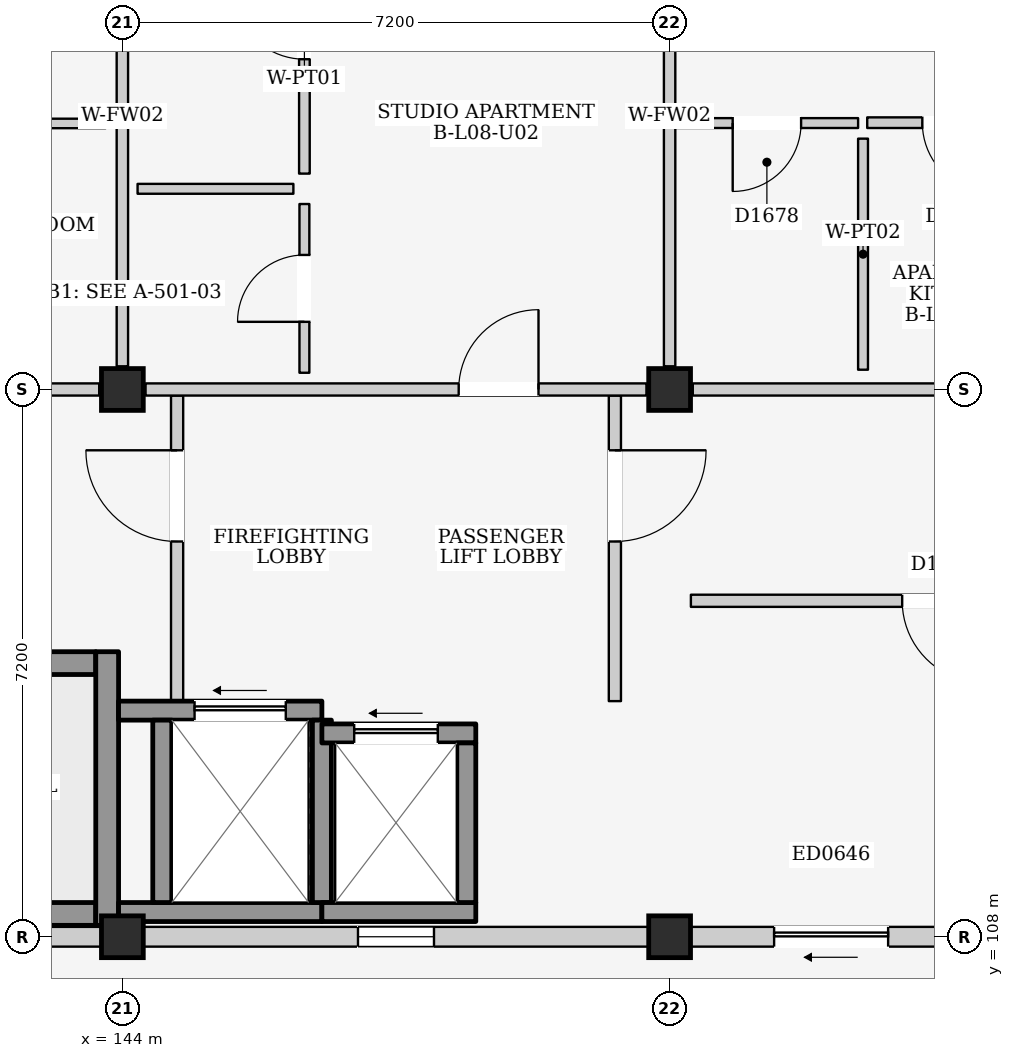
"""IFC4 building model, lengths in metres.
Left out: names, types, materials, properties, quantities, classifications, styles, units other than length and angle.
Written with IfcOpenShell. Run it as: python <this file> out.ifc"""

import sys

from ifc_helpers import new_model, si_unit, direction, frame, frame_2d, origin, origin_2d, place, context, subcontext, project, spatial, rectangle, extrude, element, fill, save


model = new_model("IFC4")
c1 = context("Model", 3, precision=1e-05, world=origin(), true_north=direction((0.0, 1.0)))
c2 = subcontext(c1, "Body", "Model", "MODEL_VIEW")
j1 = project(units=[si_unit("LENGTHUNIT", "METRE"), si_unit("PLANEANGLEUNIT", "RADIAN")], contexts=[c1])
p1 = place(None, origin())
s1 = spatial("IfcSite", under=j1, at=p1, CompositionType="ELEMENT")
p2 = place(p1, origin())
s2 = spatial("IfcBuilding", under=s1, at=p2, CompositionType="ELEMENT")
p3 = place(p2, frame((0.0, 0.0, 28.3)))
s3 = spatial("IfcBuildingStorey", under=s2, at=p3, CompositionType="ELEMENT", Elevation=28.3)
for number, where, z_axis, x_axis in (
    (1, (144.0, 108.0, 0.0), (0.0, 0.0, 1.0), (1.0, 0.0, 0.0)),
    (2, (144.0, 115.2, 0.0), (0.0, 0.0, 1.0), (1.0, 0.0, 0.0)),
    (3, (151.2, 108.0, 0.0), (0.0, 0.0, 1.0), (1.0, 0.0, 0.0)),
    (4, (151.2, 115.2, 0.0), (0.0, 0.0, 1.0), (1.0, 0.0, 0.0)),
):
    element("IfcColumn", number, at=place(p3, frame(where, z_axis=z_axis, x_axis=x_axis)), inside=s3, PredefinedType="COLUMN", context=c2, shape_type="SweptSolid", body=[
        extrude(rectangle(XDim=0.55, YDim=0.55, at=origin_2d()), origin(), (0.0, 0.0, 1.0), 3.2),
    ])
p4 = place(p3, frame((137.075, 108.0, 0.0), z_axis=(0.0, 0.0, 1.0), x_axis=(1.0, 0.0, 0.0)))
e5 = element("IfcWall", 5, at=p4, inside=s3, PredefinedType="ELEMENTEDWALL", context=c2, shape_type="SweptSolid", body=[
    extrude(rectangle(XDim=6.65, YDim=0.26, at=frame_2d((3.325, 0.0))), origin(), (0.0, 0.0, 1.0), 2.335),
])
p5 = place(p4, frame((2.825, 0.0, 1.2)))
e6 = element("IfcOpeningElement", 6, at=p5, cuts=e5, PredefinedType="OPENING", context=c2, shape_type="SweptSolid", body=[
    extrude(rectangle(XDim=1.0, YDim=0.9, at=frame_2d((0.5, 0.45))), frame((0.0, 0.145, 0.0), z_axis=(0.0, -1.0, 0.0), x_axis=(1.0, 0.0, 0.0)), (0.0, 0.0, 1.0), 0.29),
])
p6 = place(p3, frame((144.275, 108.0, 0.0), z_axis=(0.0, 0.0, 1.0), x_axis=(1.0, 0.0, 0.0)))
e7 = element("IfcWall", 7, at=p6, inside=s3, PredefinedType="ELEMENTEDWALL", context=c2, shape_type="SweptSolid", body=[
    extrude(rectangle(XDim=6.65, YDim=0.26, at=frame_2d((3.325, 0.0))), origin(), (0.0, 0.0, 1.0), 2.335),
])
p7 = place(p6, frame((2.825, 0.0, 1.2)))
e8 = element("IfcOpeningElement", 8, at=p7, cuts=e7, PredefinedType="OPENING", context=c2, shape_type="SweptSolid", body=[
    extrude(rectangle(XDim=1.0, YDim=0.9, at=frame_2d((0.5, 0.45))), frame((0.0, 0.145, 0.0), z_axis=(0.0, -1.0, 0.0), x_axis=(1.0, 0.0, 0.0)), (0.0, 0.0, 1.0), 0.29),
])
p8 = place(p3, frame((151.475, 108.0, 0.0), z_axis=(0.0, 0.0, 1.0), x_axis=(1.0, 0.0, 0.0)))
e9 = element("IfcWall", 9, at=p8, inside=s3, PredefinedType="ELEMENTEDWALL", context=c2, shape_type="SweptSolid", body=[
    extrude(rectangle(XDim=6.65, YDim=0.26, at=frame_2d((3.325, 0.0))), origin(), (0.0, 0.0, 1.0), 2.335),
])
p9 = place(p8, frame((1.1, 0.0, 0.0)))
e10 = element("IfcOpeningElement", 10, at=p9, cuts=e9, PredefinedType="OPENING", context=c2, shape_type="SweptSolid", body=[
    extrude(rectangle(XDim=1.5, YDim=2.12, at=frame_2d((0.75, 1.06))), frame((0.0, 0.145, 0.0), z_axis=(0.0, -1.0, 0.0), x_axis=(1.0, 0.0, 0.0)), (0.0, 0.0, 1.0), 0.29),
])
p10 = place(p8, frame((3.6, 0.0, 0.725)))
e11 = element("IfcOpeningElement", 11, at=p10, cuts=e9, PredefinedType="OPENING", context=c2, shape_type="SweptSolid", body=[
    extrude(rectangle(XDim=1.35, YDim=1.5, at=frame_2d((0.675, 0.75))), frame((0.0, 0.145, 0.0), z_axis=(0.0, -1.0, 0.0), x_axis=(1.0, 0.0, 0.0)), (0.0, 0.0, 1.0), 0.29),
])
p11 = place(p3, frame((137.15, 108.3, 0.0), z_axis=(0.0, 0.0, 1.0), x_axis=(1.0, 0.0, 0.0)))
e12 = element("IfcWall", 12, at=p11, inside=s3, PredefinedType="SHEAR", context=c2, shape_type="SweptSolid", body=[
    extrude(rectangle(XDim=6.5, YDim=0.3, at=frame_2d((3.25, 0.0))), origin(), (0.0, 0.0, 1.0), 2.95),
])
p12 = place(p3, frame((137.15, 111.6, 0.0), z_axis=(0.0, 0.0, 1.0), x_axis=(1.0, 0.0, 0.0)))
e13 = element("IfcWall", 13, at=p12, inside=s3, PredefinedType="SHEAR", context=c2, shape_type="SweptSolid", body=[
    extrude(rectangle(XDim=6.5, YDim=0.3, at=frame_2d((3.25, 0.0))), origin(), (0.0, 0.0, 1.0), 2.95),
])
p13 = place(p12, frame((0.18, 0.0, 0.0)))
e14 = element("IfcOpeningElement", 14, at=p13, cuts=e13, PredefinedType="OPENING", context=c2, shape_type="SweptSolid", body=[
    extrude(rectangle(XDim=1.15, YDim=2.2, at=frame_2d((0.575, 1.1))), frame((0.0, 0.165, 0.0), z_axis=(0.0, -1.0, 0.0), x_axis=(1.0, 0.0, 0.0)), (0.0, 0.0, 1.0), 0.33),
])
p14 = place(p3, frame((143.8, 108.15, 0.0), z_axis=(0.0, 0.0, 1.0), x_axis=(0.0, 1.0, 0.0)))
e15 = element("IfcWall", 15, at=p14, inside=s3, PredefinedType="SHEAR", context=c2, shape_type="SweptSolid", body=[
    extrude(rectangle(XDim=3.6, YDim=0.3, at=frame_2d((1.8, 0.0))), origin(), (0.0, 0.0, 1.0), 2.95),
])
p15 = place(p3, frame((144.72, 111.1, 0.0), z_axis=(0.0, 0.0, 1.0), x_axis=(0.0, 1.0, 0.0)))
e16 = element("IfcWall", 16, at=p15, inside=s3, PredefinedType="PARTITIONING", context=c2, shape_type="SweptSolid", body=[
    extrude(rectangle(XDim=4.02, YDim=0.16, at=frame_2d((2.01, 0.0))), origin(), (0.0, 0.0, 1.0), 2.95),
])
p16 = place(p15, frame((2.1, 0.0, 0.0)))
e17 = element("IfcOpeningElement", 17, at=p16, cuts=e16, PredefinedType="OPENING", context=c2, shape_type="SweptSolid", body=[
    extrude(rectangle(XDim=1.2, YDim=2.2, at=frame_2d((0.6, 1.1))), frame((0.0, 0.095, 0.0), z_axis=(0.0, -1.0, 0.0), x_axis=(1.0, 0.0, 0.0)), (0.0, 0.0, 1.0), 0.19),
])
p17 = place(p3, frame((150.48, 111.1, 0.0), z_axis=(0.0, 0.0, 1.0), x_axis=(0.0, 1.0, 0.0)))
e18 = element("IfcWall", 18, at=p17, inside=s3, PredefinedType="PARTITIONING", context=c2, shape_type="SweptSolid", body=[
    extrude(rectangle(XDim=4.02, YDim=0.16, at=frame_2d((2.01, 0.0))), origin(), (0.0, 0.0, 1.0), 2.95),
])
p18 = place(p17, frame((2.1, 0.0, 0.0)))
e19 = element("IfcOpeningElement", 19, at=p18, cuts=e18, PredefinedType="OPENING", context=c2, shape_type="SweptSolid", body=[
    extrude(rectangle(XDim=1.2, YDim=2.2, at=frame_2d((0.6, 1.1))), frame((0.0, 0.095, 0.0), z_axis=(0.0, -1.0, 0.0), x_axis=(1.0, 0.0, 0.0)), (0.0, 0.0, 1.0), 0.19),
])
p19 = place(p3, frame((143.95, 108.325, 0.0), z_axis=(0.0, 0.0, 1.0), x_axis=(1.0, 0.0, 0.0)))
e20 = element("IfcWall", 20, at=p19, inside=s3, PredefinedType="SHEAR", context=c2, shape_type="SweptSolid", body=[
    extrude(rectangle(XDim=2.675, YDim=0.25, at=frame_2d((1.337, 0.0))), origin(), (0.0, 0.0, 1.0), 2.95),
])
p20 = place(p3, frame((143.95, 110.975, 0.0), z_axis=(0.0, 0.0, 1.0), x_axis=(1.0, 0.0, 0.0)))
e21 = element("IfcWall", 21, at=p20, inside=s3, PredefinedType="SHEAR", context=c2, shape_type="SweptSolid", body=[
    extrude(rectangle(XDim=2.675, YDim=0.25, at=frame_2d((1.337, 0.0))), origin(), (0.0, 0.0, 1.0), 2.95),
])
p21 = place(p20, frame((1.0, 0.0, 0.0)))
e22 = element("IfcOpeningElement", 22, at=p21, cuts=e21, PredefinedType="OPENING", context=c2, shape_type="SweptSolid", body=[
    extrude(rectangle(XDim=1.2, YDim=2.25, at=frame_2d((0.6, 1.125))), frame((0.0, 0.14, 0.0), z_axis=(0.0, -1.0, 0.0), x_axis=(1.0, 0.0, 0.0)), (0.0, 0.0, 1.0), 0.28),
])
for number, where, z_axis, x_axis in (
    (23, (144.525, 108.45, 0.0), (0.0, 0.0, 1.0), (0.0, 1.0, 0.0)),
    (24, (146.625, 108.45, 0.0), (0.0, 0.0, 1.0), (0.0, 1.0, 0.0)),
):
    element("IfcWall", number, at=place(p3, frame(where, z_axis=z_axis, x_axis=x_axis)), inside=s3, PredefinedType="SHEAR", context=c2, shape_type="SweptSolid", body=[
        extrude(rectangle(XDim=2.4, YDim=0.25, at=frame_2d((1.2, 0.0))), origin(), (0.0, 0.0, 1.0), 2.95),
    ])
p22 = place(p3, frame((146.625, 108.325, 0.0), z_axis=(0.0, 0.0, 1.0), x_axis=(1.0, 0.0, 0.0)))
e25 = element("IfcWall", 25, at=p22, inside=s3, PredefinedType="SHEAR", context=c2, shape_type="SweptSolid", body=[
    extrude(rectangle(XDim=2.025, YDim=0.25, at=frame_2d((1.012, 0.0))), origin(), (0.0, 0.0, 1.0), 2.95),
])
p23 = place(p3, frame((146.625, 110.675, 0.0), z_axis=(0.0, 0.0, 1.0), x_axis=(1.0, 0.0, 0.0)))
e26 = element("IfcWall", 26, at=p23, inside=s3, PredefinedType="SHEAR", context=c2, shape_type="SweptSolid", body=[
    extrude(rectangle(XDim=2.025, YDim=0.25, at=frame_2d((1.012, 0.0))), origin(), (0.0, 0.0, 1.0), 2.95),
])
p24 = place(p23, frame((0.425, 0.0, 0.0)))
e27 = element("IfcOpeningElement", 27, at=p24, cuts=e26, PredefinedType="OPENING", context=c2, shape_type="SweptSolid", body=[
    extrude(rectangle(XDim=1.1, YDim=2.15, at=frame_2d((0.55, 1.075))), frame((0.0, 0.14, 0.0), z_axis=(0.0, -1.0, 0.0), x_axis=(1.0, 0.0, 0.0)), (0.0, 0.0, 1.0), 0.28),
])
p25 = place(p3, frame((148.525, 108.45, 0.0), z_axis=(0.0, 0.0, 1.0), x_axis=(0.0, 1.0, 0.0)))
e28 = element("IfcWall", 28, at=p25, inside=s3, PredefinedType="SHEAR", context=c2, shape_type="SweptSolid", body=[
    extrude(rectangle(XDim=2.1, YDim=0.25, at=frame_2d((1.05, 0.0))), origin(), (0.0, 0.0, 1.0), 2.95),
])
p26 = place(p3, frame((137.105, 115.2, 0.0), z_axis=(0.0, 0.0, 1.0), x_axis=(1.0, 0.0, 0.0)))
e29 = element("IfcWall", 29, at=p26, inside=s3, PredefinedType="PARTITIONING", context=c2, shape_type="SweptSolid", body=[
    extrude(rectangle(XDim=6.59, YDim=0.16, at=frame_2d((3.295, 0.0))), origin(), (0.0, 0.0, 1.0), 2.335),
])
p27 = place(p3, frame((144.0, 115.505, 0.0), z_axis=(0.0, 0.0, 1.0), x_axis=(0.0, 1.0, 0.0)))
e30 = element("IfcWall", 30, at=p27, inside=s3, PredefinedType="PARTITIONING", context=c2, shape_type="SweptSolid", body=[
    extrude(rectangle(XDim=6.59, YDim=0.15, at=frame_2d((3.295, 0.0))), origin(), (0.0, 0.0, 1.0), 2.435),
])
p28 = place(p3, frame((139.72, 118.7, 0.0), z_axis=(0.0, 0.0, 1.0), x_axis=(1.0, 0.0, 0.0)))
e31 = element("IfcWall", 31, at=p28, inside=s3, PredefinedType="PARTITIONING", context=c2, shape_type="SweptSolid", body=[
    extrude(rectangle(XDim=4.06, YDim=0.125, at=frame_2d((2.03, 0.0))), origin(), (0.0, 0.0, 1.0), 2.95),
])
p29 = place(p3, frame((144.305, 115.2, 0.0), z_axis=(0.0, 0.0, 1.0), x_axis=(1.0, 0.0, 0.0)))
e32 = element("IfcWall", 32, at=p29, inside=s3, PredefinedType="PARTITIONING", context=c2, shape_type="SweptSolid", body=[
    extrude(rectangle(XDim=6.59, YDim=0.16, at=frame_2d((3.295, 0.0))), origin(), (0.0, 0.0, 1.0), 2.335),
])
p30 = place(p29, frame((4.12, 0.0, 0.0)))
e33 = element("IfcOpeningElement", 33, at=p30, cuts=e32, PredefinedType="OPENING", context=c2, shape_type="SweptSolid", body=[
    extrude(rectangle(XDim=1.05, YDim=2.15, at=frame_2d((0.525, 1.075))), frame((0.0, 0.095, 0.0), z_axis=(0.0, -1.0, 0.0), x_axis=(1.0, 0.0, 0.0)), (0.0, 0.0, 1.0), 0.19),
])
p31 = place(p3, frame((151.2, 115.505, 0.0), z_axis=(0.0, 0.0, 1.0), x_axis=(0.0, 1.0, 0.0)))
e34 = element("IfcWall", 34, at=p31, inside=s3, PredefinedType="PARTITIONING", context=c2, shape_type="SweptSolid", body=[
    extrude(rectangle(XDim=6.59, YDim=0.15, at=frame_2d((3.295, 0.0))), origin(), (0.0, 0.0, 1.0), 2.435),
])
p32 = place(p3, frame((144.2, 117.84, 0.0), z_axis=(0.0, 0.0, 1.0), x_axis=(1.0, 0.0, 0.0)))
e35 = element("IfcWall", 35, at=p32, inside=s3, PredefinedType="PARTITIONING", context=c2, shape_type="SweptSolid", body=[
    extrude(rectangle(XDim=2.05, YDim=0.13, at=frame_2d((1.025, 0.0))), origin(), (0.0, 0.0, 1.0), 2.95),
])
p33 = place(p3, frame((146.395, 115.42, 0.0), z_axis=(0.0, 0.0, 1.0), x_axis=(0.0, 1.0, 0.0)))
e36 = element("IfcWall", 36, at=p33, inside=s3, PredefinedType="PARTITIONING", context=c2, shape_type="SweptSolid", body=[
    extrude(rectangle(XDim=2.22, YDim=0.13, at=frame_2d((1.11, 0.0))), origin(), (0.0, 0.0, 1.0), 2.95),
])
p34 = place(p33, frame((0.67, 0.0, 0.0)))
e37 = element("IfcOpeningElement", 37, at=p34, cuts=e36, PredefinedType="OPENING", context=c2, shape_type="SweptSolid", body=[
    extrude(rectangle(XDim=0.88, YDim=2.1, at=frame_2d((0.44, 1.05))), frame((0.0, 0.08, 0.0), z_axis=(0.0, -1.0, 0.0), x_axis=(1.0, 0.0, 0.0)), (0.0, 0.0, 1.0), 0.16),
])
p35 = place(p3, frame((146.395, 118.04, 0.0), z_axis=(0.0, 0.0, 1.0), x_axis=(0.0, 1.0, 0.0)))
e38 = element("IfcWall", 38, at=p35, inside=s3, PredefinedType="PARTITIONING", context=c2, shape_type="SweptSolid", body=[
    extrude(rectangle(XDim=3.94, YDim=0.14, at=frame_2d((1.97, 0.0))), origin(), (0.0, 0.0, 1.0), 2.95),
])
p36 = place(p35, frame((1.505, 0.0, 0.0)))
e39 = element("IfcOpeningElement", 39, at=p36, cuts=e38, PredefinedType="OPENING", context=c2, shape_type="SweptSolid", body=[
    extrude(rectangle(XDim=0.93, YDim=2.14, at=frame_2d((0.465, 1.07))), frame((0.0, 0.085, 0.0), z_axis=(0.0, -1.0, 0.0), x_axis=(1.0, 0.0, 0.0)), (0.0, 0.0, 1.0), 0.17),
])
p37 = place(p3, frame((151.505, 115.2, 0.0), z_axis=(0.0, 0.0, 1.0), x_axis=(1.0, 0.0, 0.0)))
e40 = element("IfcWall", 40, at=p37, inside=s3, PredefinedType="PARTITIONING", context=c2, shape_type="SweptSolid", body=[
    extrude(rectangle(XDim=6.59, YDim=0.16, at=frame_2d((3.295, 0.0))), origin(), (0.0, 0.0, 1.0), 2.335),
])
p38 = place(p37, frame((5.3, 0.0, 0.0)))
e41 = element("IfcOpeningElement", 41, at=p38, cuts=e40, PredefinedType="OPENING", context=c2, shape_type="SweptSolid", body=[
    extrude(rectangle(XDim=1.05, YDim=2.15, at=frame_2d((0.525, 1.075))), frame((0.0, 0.095, 0.0), z_axis=(0.0, -1.0, 0.0), x_axis=(1.0, 0.0, 0.0)), (0.0, 0.0, 1.0), 0.19),
])
p39 = place(p3, frame((151.28, 118.705, 0.0), z_axis=(0.0, 0.0, 1.0), x_axis=(1.0, 0.0, 0.0)))
e42 = element("IfcWall", 42, at=p39, inside=s3, PredefinedType="PARTITIONING", context=c2, shape_type="SweptSolid", body=[
    extrude(rectangle(XDim=2.4, YDim=0.13, at=frame_2d((1.2, 0.0))), origin(), (0.0, 0.0, 1.0), 2.95),
])
p40 = place(p39, frame((0.75, 0.0, 0.0)))
e43 = element("IfcOpeningElement", 43, at=p40, cuts=e42, PredefinedType="OPENING", context=c2, shape_type="SweptSolid", body=[
    extrude(rectangle(XDim=0.9, YDim=2.1, at=frame_2d((0.45, 1.05))), frame((0.0, 0.08, 0.0), z_axis=(0.0, -1.0, 0.0), x_axis=(1.0, 0.0, 0.0)), (0.0, 0.0, 1.0), 0.16),
])
p41 = place(p3, frame((153.745, 115.46, 0.0), z_axis=(0.0, 0.0, 1.0), x_axis=(0.0, 1.0, 0.0)))
e44 = element("IfcWall", 44, at=p41, inside=s3, PredefinedType="PARTITIONING", context=c2, shape_type="SweptSolid", body=[
    extrude(rectangle(XDim=3.04, YDim=0.13, at=frame_2d((1.52, 0.0))), origin(), (0.0, 0.0, 1.0), 2.95),
])
p42 = place(p3, frame((153.8, 118.71, 0.0), z_axis=(0.0, 0.0, 1.0), x_axis=(1.0, 0.0, 0.0)))
e45 = element("IfcWall", 45, at=p42, inside=s3, PredefinedType="PARTITIONING", context=c2, shape_type="SweptSolid", body=[
    extrude(rectangle(XDim=2.38, YDim=0.14, at=frame_2d((1.19, 0.0))), origin(), (0.0, 0.0, 1.0), 2.95),
])
p43 = place(p42, frame((0.725, 0.0, 0.0)))
e46 = element("IfcOpeningElement", 46, at=p43, cuts=e45, PredefinedType="OPENING", context=c2, shape_type="SweptSolid", body=[
    extrude(rectangle(XDim=0.93, YDim=2.14, at=frame_2d((0.465, 1.07))), frame((0.0, 0.085, 0.0), z_axis=(0.0, -1.0, 0.0), x_axis=(1.0, 0.0, 0.0)), (0.0, 0.0, 1.0), 0.17),
])
p44 = place(p3, frame((151.48, 112.42, 0.0), z_axis=(0.0, 0.0, 1.0), x_axis=(1.0, 0.0, 0.0)))
e47 = element("IfcWall", 47, at=p44, inside=s3, PredefinedType="PARTITIONING", context=c2, shape_type="SweptSolid", body=[
    extrude(rectangle(XDim=6.64, YDim=0.16, at=frame_2d((3.32, 0.0))), origin(), (0.0, 0.0, 1.0), 2.95),
])
p45 = place(p44, frame((2.78, 0.0, 0.0)))
e48 = element("IfcOpeningElement", 48, at=p45, cuts=e47, PredefinedType="OPENING", context=c2, shape_type="SweptSolid", body=[
    extrude(rectangle(XDim=1.08, YDim=2.22, at=frame_2d((0.54, 1.11))), frame((0.0, 0.095, 0.0), z_axis=(0.0, -1.0, 0.0), x_axis=(1.0, 0.0, 0.0)), (0.0, 0.0, 1.0), 0.19),
])
p46 = place(p7, origin())
e49 = element("IfcWindow", 49, at=p46, inside=s3, PartitioningType="SINGLE_PANEL", PredefinedType="WINDOW", context=c2, shape_type="SweptSolid", body=[
    extrude(rectangle(XDim=1.0, YDim=0.9, at=frame_2d((0.5, 0.45))), frame((0.0, 0.03, 0.0), z_axis=(0.0, -1.0, 0.0), x_axis=(1.0, 0.0, 0.0)), (0.0, 0.0, 1.0), 0.06),
])
fill(e8, e49)
p47 = place(p9, frame((1.5, 0.0, 0.0), z_axis=(0.0, 0.0, 1.0), x_axis=(-1.0, 0.0, 0.0)))
e50 = element("IfcDoor", 50, at=p47, inside=s3, OperationType="SLIDING_TO_LEFT", PredefinedType="DOOR", context=c2, shape_type="SweptSolid", body=[
    extrude(rectangle(XDim=1.5, YDim=2.12, at=frame_2d((0.75, 1.06))), frame((0.0, 0.025, 0.0), z_axis=(0.0, -1.0, 0.0), x_axis=(1.0, 0.0, 0.0)), (0.0, 0.0, 1.0), 0.05),
])
fill(e10, e50)
p48 = place(p16, origin())
e51 = element("IfcDoor", 51, at=p48, inside=s3, OperationType="SINGLE_SWING_RIGHT", PredefinedType="DOOR", context=c2, shape_type="SweptSolid", body=[
    extrude(rectangle(XDim=1.2, YDim=2.2, at=frame_2d((0.6, 1.1))), frame((0.0, 0.025, 0.0), z_axis=(0.0, -1.0, 0.0), x_axis=(1.0, 0.0, 0.0)), (0.0, 0.0, 1.0), 0.05),
])
fill(e17, e51)
p49 = place(p18, frame((1.2, 0.0, 0.0), z_axis=(0.0, 0.0, 1.0), x_axis=(-1.0, 0.0, 0.0)))
e52 = element("IfcDoor", 52, at=p49, inside=s3, OperationType="SINGLE_SWING_LEFT", PredefinedType="DOOR", context=c2, shape_type="SweptSolid", body=[
    extrude(rectangle(XDim=1.2, YDim=2.2, at=frame_2d((0.6, 1.1))), frame((0.0, 0.025, 0.0), z_axis=(0.0, -1.0, 0.0), x_axis=(1.0, 0.0, 0.0)), (0.0, 0.0, 1.0), 0.05),
])
fill(e19, e52)
p50 = place(p21, origin())
e53 = element("IfcDoor", 53, at=p50, inside=s3, OperationType="SLIDING_TO_LEFT", PredefinedType="DOOR", context=c2, shape_type="SweptSolid", body=[
    extrude(rectangle(XDim=1.2, YDim=2.25, at=frame_2d((0.6, 1.125))), frame((0.0, 0.025, 0.0), z_axis=(0.0, -1.0, 0.0), x_axis=(1.0, 0.0, 0.0)), (0.0, 0.0, 1.0), 0.05),
])
fill(e22, e53)
p51 = place(p24, origin())
e54 = element("IfcDoor", 54, at=p51, inside=s3, OperationType="SLIDING_TO_LEFT", PredefinedType="DOOR", context=c2, shape_type="SweptSolid", body=[
    extrude(rectangle(XDim=1.1, YDim=2.15, at=frame_2d((0.55, 1.075))), frame((0.0, 0.025, 0.0), z_axis=(0.0, -1.0, 0.0), x_axis=(1.0, 0.0, 0.0)), (0.0, 0.0, 1.0), 0.05),
])
fill(e27, e54)
p52 = place(p30, origin())
e55 = element("IfcDoor", 55, at=p52, inside=s3, OperationType="SINGLE_SWING_RIGHT", PredefinedType="DOOR", context=c2, shape_type="SweptSolid", body=[
    extrude(rectangle(XDim=1.05, YDim=2.15, at=frame_2d((0.525, 1.075))), frame((0.0, 0.025, 0.0), z_axis=(0.0, -1.0, 0.0), x_axis=(1.0, 0.0, 0.0)), (0.0, 0.0, 1.0), 0.05),
])
fill(e33, e55)
p53 = place(p34, origin())
e56 = element("IfcDoor", 56, at=p53, inside=s3, OperationType="SINGLE_SWING_LEFT", PredefinedType="DOOR", context=c2, shape_type="SweptSolid", body=[
    extrude(rectangle(XDim=0.88, YDim=2.1, at=frame_2d((0.44, 1.05))), frame((0.0, 0.025, 0.0), z_axis=(0.0, -1.0, 0.0), x_axis=(1.0, 0.0, 0.0)), (0.0, 0.0, 1.0), 0.05),
])
fill(e37, e56)
p54 = place(p36, origin())
e57 = element("IfcDoor", 57, at=p54, inside=s3, OperationType="SINGLE_SWING_RIGHT", PredefinedType="DOOR", context=c2, shape_type="SweptSolid", body=[
    extrude(rectangle(XDim=0.93, YDim=2.14, at=frame_2d((0.465, 1.07))), frame((0.0, 0.025, 0.0), z_axis=(0.0, -1.0, 0.0), x_axis=(1.0, 0.0, 0.0)), (0.0, 0.0, 1.0), 0.05),
])
fill(e39, e57)
p55 = place(p40, frame((0.9, 0.0, 0.0), z_axis=(0.0, 0.0, 1.0), x_axis=(-1.0, 0.0, 0.0)))
e58 = element("IfcDoor", 58, at=p55, inside=s3, OperationType="SINGLE_SWING_RIGHT", PredefinedType="DOOR", context=c2, shape_type="SweptSolid", body=[
    extrude(rectangle(XDim=0.9, YDim=2.1, at=frame_2d((0.45, 1.05))), frame((0.0, 0.025, 0.0), z_axis=(0.0, -1.0, 0.0), x_axis=(1.0, 0.0, 0.0)), (0.0, 0.0, 1.0), 0.05),
])
fill(e43, e58)
p56 = place(p43, frame((0.93, 0.0, 0.0), z_axis=(0.0, 0.0, 1.0), x_axis=(-1.0, 0.0, 0.0)))
e59 = element("IfcDoor", 59, at=p56, inside=s3, OperationType="SINGLE_SWING_LEFT", PredefinedType="DOOR", context=c2, shape_type="SweptSolid", body=[
    extrude(rectangle(XDim=0.93, YDim=2.14, at=frame_2d((0.465, 1.07))), frame((0.0, 0.025, 0.0), z_axis=(0.0, -1.0, 0.0), x_axis=(1.0, 0.0, 0.0)), (0.0, 0.0, 1.0), 0.05),
])
fill(e46, e59)
p57 = place(p45, frame((1.08, 0.0, 0.0), z_axis=(0.0, 0.0, 1.0), x_axis=(-1.0, 0.0, 0.0)))
e60 = element("IfcDoor", 60, at=p57, inside=s3, OperationType="SINGLE_SWING_LEFT", PredefinedType="DOOR", context=c2, shape_type="SweptSolid", body=[
    extrude(rectangle(XDim=1.08, YDim=2.22, at=frame_2d((0.54, 1.11))), frame((0.0, 0.025, 0.0), z_axis=(0.0, -1.0, 0.0), x_axis=(1.0, 0.0, 0.0)), (0.0, 0.0, 1.0), 0.05),
])
fill(e48, e60)
save(model, sys.argv[1])
